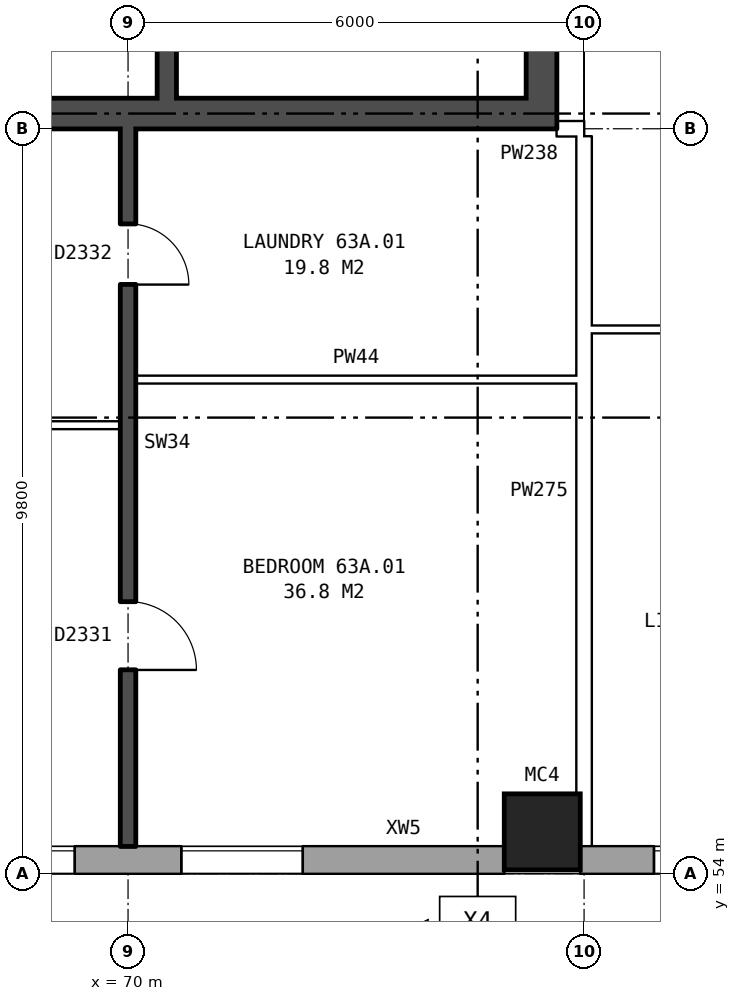
"""IFC4 building model, lengths in metres.
Left out: names, types, materials, properties, quantities, classifications, styles, units other than length and angle.
Written with IfcOpenShell. Run it as: python <this file> out.ifc"""

import sys

from ifc_helpers import new_model, si_unit, direction, frame, frame_2d, origin, origin_2d, place, context, subcontext, project, spatial, rectangle, hollow_rectangle, extrude, element, fill, save


model = new_model("IFC4")
c1 = context("Model", 3, precision=1e-05, world=origin(), true_north=direction((0.0, 1.0)))
c2 = subcontext(c1, "Body", "Model", "MODEL_VIEW")
j1 = project(units=[si_unit("LENGTHUNIT", "METRE"), si_unit("PLANEANGLEUNIT", "RADIAN")], contexts=[c1])
p1 = place(None, origin())
s1 = spatial("IfcSite", under=j1, at=p1, CompositionType="ELEMENT")
p2 = place(p1, origin())
s2 = spatial("IfcBuilding", under=s1, at=p2, CompositionType="ELEMENT")
p3 = place(p2, frame((0.0, 0.0, 224.5)))
s3 = spatial("IfcBuildingStorey", under=s2, at=p3, CompositionType="ELEMENT", Elevation=224.5)
p4 = place(p3, frame((75.45, 54.55, 0.0), z_axis=(0.0, 0.0, 1.0), x_axis=(1.0, 0.0, 0.0)))
e1 = element("IfcColumn", 1, at=p4, inside=s3, PredefinedType="COLUMN", context=c2, shape_type="SweptSolid", body=[
    extrude(hollow_rectangle(XDim=1.0, YDim=1.0, WallThickness=0.055, at=origin_2d()), origin(), (0.0, 0.0, 1.0), 3.1),
])
p5 = place(p3, frame((35.075, 54.18, 0.0), z_axis=(0.0, 0.0, 1.0), x_axis=(1.0, 0.0, 0.0)))
e2 = element("IfcWall", 2, at=p5, inside=s3, PredefinedType="STANDARD", context=c2, shape_type="SweptSolid", body=[
    extrude(rectangle(XDim=39.875, YDim=0.36, at=frame_2d((19.938, 0.0))), origin(), (0.0, 0.0, 1.0), 2.85),
])
p6 = place(p5, frame((2.625, 0.0, 0.8)))
e3 = element("IfcOpeningElement", 3, at=p6, cuts=e2, PredefinedType="OPENING", context=c2, shape_type="SweptSolid", body=[
    extrude(rectangle(XDim=1.6, YDim=1.8, at=frame_2d((0.8, 0.9))), frame((0.0, 0.19, 0.0), z_axis=(0.0, -1.0, 0.0), x_axis=(1.0, 0.0, 0.0)), (0.0, 0.0, 1.0), 0.38),
])
p7 = place(p5, frame((5.625, 0.0, 0.8)))
e4 = element("IfcOpeningElement", 4, at=p7, cuts=e2, PredefinedType="OPENING", context=c2, shape_type="SweptSolid", body=[
    extrude(rectangle(XDim=1.6, YDim=1.8, at=frame_2d((0.8, 0.9))), frame((0.0, 0.19, 0.0), z_axis=(0.0, -1.0, 0.0), x_axis=(1.0, 0.0, 0.0)), (0.0, 0.0, 1.0), 0.38),
])
p8 = place(p5, frame((8.625, 0.0, 0.8)))
e5 = element("IfcOpeningElement", 5, at=p8, cuts=e2, PredefinedType="OPENING", context=c2, shape_type="SweptSolid", body=[
    extrude(rectangle(XDim=1.6, YDim=1.8, at=frame_2d((0.8, 0.9))), frame((0.0, 0.19, 0.0), z_axis=(0.0, -1.0, 0.0), x_axis=(1.0, 0.0, 0.0)), (0.0, 0.0, 1.0), 0.38),
])
p9 = place(p5, frame((11.125, 0.0, 1.65)))
e6 = element("IfcOpeningElement", 6, at=p9, cuts=e2, PredefinedType="OPENING", context=c2, shape_type="SweptSolid", body=[
    extrude(rectangle(XDim=0.6, YDim=0.9, at=frame_2d((0.3, 0.45))), frame((0.0, 0.19, 0.0), z_axis=(0.0, -1.0, 0.0), x_axis=(1.0, 0.0, 0.0)), (0.0, 0.0, 1.0), 0.38),
])
p10 = place(p5, frame((14.625, 0.0, 0.8)))
e7 = element("IfcOpeningElement", 7, at=p10, cuts=e2, PredefinedType="OPENING", context=c2, shape_type="SweptSolid", body=[
    extrude(rectangle(XDim=1.6, YDim=1.8, at=frame_2d((0.8, 0.9))), frame((0.0, 0.19, 0.0), z_axis=(0.0, -1.0, 0.0), x_axis=(1.0, 0.0, 0.0)), (0.0, 0.0, 1.0), 0.38),
])
p11 = place(p5, frame((17.625, 0.0, 0.8)))
e8 = element("IfcOpeningElement", 8, at=p11, cuts=e2, PredefinedType="OPENING", context=c2, shape_type="SweptSolid", body=[
    extrude(rectangle(XDim=1.6, YDim=1.8, at=frame_2d((0.8, 0.9))), frame((0.0, 0.19, 0.0), z_axis=(0.0, -1.0, 0.0), x_axis=(1.0, 0.0, 0.0)), (0.0, 0.0, 1.0), 0.38),
])
p12 = place(p5, frame((20.625, 0.0, 0.8)))
e9 = element("IfcOpeningElement", 9, at=p12, cuts=e2, PredefinedType="OPENING", context=c2, shape_type="SweptSolid", body=[
    extrude(rectangle(XDim=1.6, YDim=1.8, at=frame_2d((0.8, 0.9))), frame((0.0, 0.19, 0.0), z_axis=(0.0, -1.0, 0.0), x_axis=(1.0, 0.0, 0.0)), (0.0, 0.0, 1.0), 0.38),
])
p13 = place(p5, frame((23.125, 0.0, 0.75)))
e10 = element("IfcOpeningElement", 10, at=p13, cuts=e2, PredefinedType="OPENING", context=c2, shape_type="SweptSolid", body=[
    extrude(rectangle(XDim=1.2, YDim=1.8, at=frame_2d((0.6, 0.9))), frame((0.0, 0.19, 0.0), z_axis=(0.0, -1.0, 0.0), x_axis=(1.0, 0.0, 0.0)), (0.0, 0.0, 1.0), 0.38),
])
p14 = place(p5, frame((26.625, 0.0, 0.8)))
e11 = element("IfcOpeningElement", 11, at=p14, cuts=e2, PredefinedType="OPENING", context=c2, shape_type="SweptSolid", body=[
    extrude(rectangle(XDim=1.6, YDim=1.8, at=frame_2d((0.8, 0.9))), frame((0.0, 0.19, 0.0), z_axis=(0.0, -1.0, 0.0), x_axis=(1.0, 0.0, 0.0)), (0.0, 0.0, 1.0), 0.38),
])
p15 = place(p5, frame((29.625, 0.0, 0.8)))
e12 = element("IfcOpeningElement", 12, at=p15, cuts=e2, PredefinedType="OPENING", context=c2, shape_type="SweptSolid", body=[
    extrude(rectangle(XDim=1.6, YDim=1.8, at=frame_2d((0.8, 0.9))), frame((0.0, 0.19, 0.0), z_axis=(0.0, -1.0, 0.0), x_axis=(1.0, 0.0, 0.0)), (0.0, 0.0, 1.0), 0.38),
])
p16 = place(p5, frame((32.625, 0.0, 0.8)))
e13 = element("IfcOpeningElement", 13, at=p16, cuts=e2, PredefinedType="OPENING", context=c2, shape_type="SweptSolid", body=[
    extrude(rectangle(XDim=1.6, YDim=1.8, at=frame_2d((0.8, 0.9))), frame((0.0, 0.19, 0.0), z_axis=(0.0, -1.0, 0.0), x_axis=(1.0, 0.0, 0.0)), (0.0, 0.0, 1.0), 0.38),
])
p17 = place(p5, frame((35.625, 0.0, 0.8)))
e14 = element("IfcOpeningElement", 14, at=p17, cuts=e2, PredefinedType="OPENING", context=c2, shape_type="SweptSolid", body=[
    extrude(rectangle(XDim=1.6, YDim=1.8, at=frame_2d((0.8, 0.9))), frame((0.0, 0.19, 0.0), z_axis=(0.0, -1.0, 0.0), x_axis=(1.0, 0.0, 0.0)), (0.0, 0.0, 1.0), 0.38),
])
p18 = place(p5, frame((12.925, 0.0, 0.15)))
e15 = element("IfcOpeningElement", 15, at=p18, cuts=e2, PredefinedType="OPENING", context=c2, shape_type="SweptSolid", body=[
    extrude(rectangle(XDim=0.8, YDim=1.5, at=frame_2d((0.4, 0.75))), frame((0.0, 0.19, 0.0), z_axis=(0.0, -1.0, 0.0), x_axis=(1.0, 0.0, 0.0)), (0.0, 0.0, 1.0), 0.38),
])
p19 = place(p5, frame((24.625, 0.0, 0.25)))
e16 = element("IfcOpeningElement", 16, at=p19, cuts=e2, PredefinedType="OPENING", context=c2, shape_type="SweptSolid", body=[
    extrude(rectangle(XDim=0.6, YDim=0.9, at=frame_2d((0.3, 0.45))), frame((0.0, 0.19, 0.0), z_axis=(0.0, -1.0, 0.0), x_axis=(1.0, 0.0, 0.0)), (0.0, 0.0, 1.0), 0.38),
])
p20 = place(p3, frame((75.95, 54.18, 0.0), z_axis=(0.0, 0.0, 1.0), x_axis=(1.0, 0.0, 0.0)))
e17 = element("IfcWall", 17, at=p20, inside=s3, PredefinedType="STANDARD", context=c2, shape_type="SweptSolid", body=[
    extrude(rectangle(XDim=55.1, YDim=0.36, at=frame_2d((27.55, 0.0))), origin(), (0.0, 0.0, 1.0), 2.85),
])
p21 = place(p20, frame((0.969, 0.0, 0.8)))
e18 = element("IfcOpeningElement", 18, at=p21, cuts=e17, PredefinedType="OPENING", context=c2, shape_type="SweptSolid", body=[
    extrude(rectangle(XDim=1.6, YDim=1.8, at=frame_2d((0.8, 0.9))), frame((0.0, 0.19, 0.0), z_axis=(0.0, -1.0, 0.0), x_axis=(1.0, 0.0, 0.0)), (0.0, 0.0, 1.0), 0.38),
])
p22 = place(p20, frame((4.406, 0.0, 0.8)))
e19 = element("IfcOpeningElement", 19, at=p22, cuts=e17, PredefinedType="OPENING", context=c2, shape_type="SweptSolid", body=[
    extrude(rectangle(XDim=1.6, YDim=1.8, at=frame_2d((0.8, 0.9))), frame((0.0, 0.19, 0.0), z_axis=(0.0, -1.0, 0.0), x_axis=(1.0, 0.0, 0.0)), (0.0, 0.0, 1.0), 0.38),
])
p23 = place(p20, frame((7.844, 0.0, 0.8)))
e20 = element("IfcOpeningElement", 20, at=p23, cuts=e17, PredefinedType="OPENING", context=c2, shape_type="SweptSolid", body=[
    extrude(rectangle(XDim=1.6, YDim=1.8, at=frame_2d((0.8, 0.9))), frame((0.0, 0.19, 0.0), z_axis=(0.0, -1.0, 0.0), x_axis=(1.0, 0.0, 0.0)), (0.0, 0.0, 1.0), 0.38),
])
p24 = place(p20, frame((11.281, 0.0, 0.8)))
e21 = element("IfcOpeningElement", 21, at=p24, cuts=e17, PredefinedType="OPENING", context=c2, shape_type="SweptSolid", body=[
    extrude(rectangle(XDim=1.6, YDim=1.8, at=frame_2d((0.8, 0.9))), frame((0.0, 0.19, 0.0), z_axis=(0.0, -1.0, 0.0), x_axis=(1.0, 0.0, 0.0)), (0.0, 0.0, 1.0), 0.38),
])
p25 = place(p20, frame((14.719, 0.0, 0.8)))
e22 = element("IfcOpeningElement", 22, at=p25, cuts=e17, PredefinedType="OPENING", context=c2, shape_type="SweptSolid", body=[
    extrude(rectangle(XDim=1.6, YDim=1.8, at=frame_2d((0.8, 0.9))), frame((0.0, 0.19, 0.0), z_axis=(0.0, -1.0, 0.0), x_axis=(1.0, 0.0, 0.0)), (0.0, 0.0, 1.0), 0.38),
])
p26 = place(p20, frame((18.156, 0.0, 0.8)))
e23 = element("IfcOpeningElement", 23, at=p26, cuts=e17, PredefinedType="OPENING", context=c2, shape_type="SweptSolid", body=[
    extrude(rectangle(XDim=1.6, YDim=1.8, at=frame_2d((0.8, 0.9))), frame((0.0, 0.19, 0.0), z_axis=(0.0, -1.0, 0.0), x_axis=(1.0, 0.0, 0.0)), (0.0, 0.0, 1.0), 0.38),
])
p27 = place(p20, frame((21.594, 0.0, 0.8)))
e24 = element("IfcOpeningElement", 24, at=p27, cuts=e17, PredefinedType="OPENING", context=c2, shape_type="SweptSolid", body=[
    extrude(rectangle(XDim=1.6, YDim=1.8, at=frame_2d((0.8, 0.9))), frame((0.0, 0.19, 0.0), z_axis=(0.0, -1.0, 0.0), x_axis=(1.0, 0.0, 0.0)), (0.0, 0.0, 1.0), 0.38),
])
p28 = place(p20, frame((25.031, 0.0, 0.8)))
e25 = element("IfcOpeningElement", 25, at=p28, cuts=e17, PredefinedType="OPENING", context=c2, shape_type="SweptSolid", body=[
    extrude(rectangle(XDim=1.6, YDim=1.8, at=frame_2d((0.8, 0.9))), frame((0.0, 0.19, 0.0), z_axis=(0.0, -1.0, 0.0), x_axis=(1.0, 0.0, 0.0)), (0.0, 0.0, 1.0), 0.38),
])
p29 = place(p20, frame((28.469, 0.0, 0.8)))
e26 = element("IfcOpeningElement", 26, at=p29, cuts=e17, PredefinedType="OPENING", context=c2, shape_type="SweptSolid", body=[
    extrude(rectangle(XDim=1.6, YDim=1.8, at=frame_2d((0.8, 0.9))), frame((0.0, 0.19, 0.0), z_axis=(0.0, -1.0, 0.0), x_axis=(1.0, 0.0, 0.0)), (0.0, 0.0, 1.0), 0.38),
])
p30 = place(p20, frame((31.906, 0.0, 0.8)))
e27 = element("IfcOpeningElement", 27, at=p30, cuts=e17, PredefinedType="OPENING", context=c2, shape_type="SweptSolid", body=[
    extrude(rectangle(XDim=1.6, YDim=1.8, at=frame_2d((0.8, 0.9))), frame((0.0, 0.19, 0.0), z_axis=(0.0, -1.0, 0.0), x_axis=(1.0, 0.0, 0.0)), (0.0, 0.0, 1.0), 0.38),
])
p31 = place(p20, frame((35.344, 0.0, 0.8)))
e28 = element("IfcOpeningElement", 28, at=p31, cuts=e17, PredefinedType="OPENING", context=c2, shape_type="SweptSolid", body=[
    extrude(rectangle(XDim=1.6, YDim=1.8, at=frame_2d((0.8, 0.9))), frame((0.0, 0.19, 0.0), z_axis=(0.0, -1.0, 0.0), x_axis=(1.0, 0.0, 0.0)), (0.0, 0.0, 1.0), 0.38),
])
p32 = place(p20, frame((38.781, 0.0, 0.8)))
e29 = element("IfcOpeningElement", 29, at=p32, cuts=e17, PredefinedType="OPENING", context=c2, shape_type="SweptSolid", body=[
    extrude(rectangle(XDim=1.6, YDim=1.8, at=frame_2d((0.8, 0.9))), frame((0.0, 0.19, 0.0), z_axis=(0.0, -1.0, 0.0), x_axis=(1.0, 0.0, 0.0)), (0.0, 0.0, 1.0), 0.38),
])
p33 = place(p20, frame((42.219, 0.0, 0.8)))
e30 = element("IfcOpeningElement", 30, at=p33, cuts=e17, PredefinedType="OPENING", context=c2, shape_type="SweptSolid", body=[
    extrude(rectangle(XDim=1.6, YDim=1.8, at=frame_2d((0.8, 0.9))), frame((0.0, 0.19, 0.0), z_axis=(0.0, -1.0, 0.0), x_axis=(1.0, 0.0, 0.0)), (0.0, 0.0, 1.0), 0.38),
])
p34 = place(p20, frame((45.656, 0.0, 0.8)))
e31 = element("IfcOpeningElement", 31, at=p34, cuts=e17, PredefinedType="OPENING", context=c2, shape_type="SweptSolid", body=[
    extrude(rectangle(XDim=1.6, YDim=1.8, at=frame_2d((0.8, 0.9))), frame((0.0, 0.19, 0.0), z_axis=(0.0, -1.0, 0.0), x_axis=(1.0, 0.0, 0.0)), (0.0, 0.0, 1.0), 0.38),
])
p35 = place(p20, frame((49.094, 0.0, 0.8)))
e32 = element("IfcOpeningElement", 32, at=p35, cuts=e17, PredefinedType="OPENING", context=c2, shape_type="SweptSolid", body=[
    extrude(rectangle(XDim=1.6, YDim=1.8, at=frame_2d((0.8, 0.9))), frame((0.0, 0.19, 0.0), z_axis=(0.0, -1.0, 0.0), x_axis=(1.0, 0.0, 0.0)), (0.0, 0.0, 1.0), 0.38),
])
p36 = place(p20, frame((52.531, 0.0, 0.8)))
e33 = element("IfcOpeningElement", 33, at=p36, cuts=e17, PredefinedType="OPENING", context=c2, shape_type="SweptSolid", body=[
    extrude(rectangle(XDim=1.6, YDim=1.8, at=frame_2d((0.8, 0.9))), frame((0.0, 0.19, 0.0), z_axis=(0.0, -1.0, 0.0), x_axis=(1.0, 0.0, 0.0)), (0.0, 0.0, 1.0), 0.38),
])
p37 = place(p3, frame((75.44, 63.8, 0.0), z_axis=(0.0, 0.0, 1.0), x_axis=(0.0, 1.0, 0.0)))
e34 = element("IfcWall", 34, at=p37, inside=s3, PredefinedType="SHEAR", context=c2, shape_type="SweptSolid", body=[
    extrude(rectangle(XDim=12.4, YDim=0.4, at=frame_2d((6.2, 0.0))), origin(), (0.0, 0.0, 1.0), 2.85),
])
p38 = place(p37, frame((9.8, 0.0, 0.0)))
e35 = element("IfcOpeningElement", 35, at=p38, cuts=e34, PredefinedType="OPENING", context=c2, shape_type="SweptSolid", body=[
    extrude(rectangle(XDim=1.1, YDim=2.1, at=frame_2d((0.55, 1.05))), frame((0.0, 0.21, 0.0), z_axis=(0.0, -1.0, 0.0), x_axis=(1.0, 0.0, 0.0)), (0.0, 0.0, 1.0), 0.42),
])
p39 = place(p3, frame((67.04, 64.0, 0.0), z_axis=(0.0, 0.0, 1.0), x_axis=(1.0, 0.0, 0.0)))
e36 = element("IfcWall", 36, at=p39, inside=s3, PredefinedType="SHEAR", context=c2, shape_type="SweptSolid", body=[
    extrude(rectangle(XDim=8.2, YDim=0.4, at=frame_2d((4.1, 0.0))), origin(), (0.0, 0.0, 1.0), 2.85),
])
p40 = place(p3, frame((70.51, 64.2, 0.0), z_axis=(0.0, 0.0, 1.0), x_axis=(0.0, 1.0, 0.0)))
e37 = element("IfcWall", 37, at=p40, inside=s3, PredefinedType="SHEAR", context=c2, shape_type="SweptSolid", body=[
    extrude(rectangle(XDim=2.525, YDim=0.25, at=frame_2d((1.263, 0.0))), origin(), (0.0, 0.0, 1.0), 2.85),
])
p41 = place(p3, frame((64.1, 59.9, 0.0), z_axis=(0.0, 0.0, 1.0), x_axis=(1.0, 0.0, 0.0)))
e38 = element("IfcWall", 38, at=p41, inside=s3, PredefinedType="PARTITIONING", context=c2, shape_type="SweptSolid", body=[
    extrude(rectangle(XDim=5.8, YDim=0.1, at=frame_2d((2.9, 0.0))), origin(), (0.0, 0.0, 1.0), 2.85),
])
p42 = place(p41, frame((3.6, 0.0, 0.0)))
e39 = element("IfcOpeningElement", 39, at=p42, cuts=e38, PredefinedType="OPENING", context=c2, shape_type="SweptSolid", body=[
    extrude(rectangle(XDim=0.9, YDim=2.1, at=frame_2d((0.45, 1.05))), frame((0.0, 0.06, 0.0), z_axis=(0.0, -1.0, 0.0), x_axis=(1.0, 0.0, 0.0)), (0.0, 0.0, 1.0), 0.12),
])
p43 = place(p41, frame((0.7, 0.0, 0.0)))
e40 = element("IfcOpeningElement", 40, at=p43, cuts=e38, PredefinedType="OPENING", context=c2, shape_type="SweptSolid", body=[
    extrude(rectangle(XDim=0.9, YDim=2.1, at=frame_2d((0.45, 1.05))), frame((0.0, 0.06, 0.0), z_axis=(0.0, -1.0, 0.0), x_axis=(1.0, 0.0, 0.0)), (0.0, 0.0, 1.0), 0.12),
])
p44 = place(p3, frame((70.1, 60.5, 0.0), z_axis=(0.0, 0.0, 1.0), x_axis=(1.0, 0.0, 0.0)))
e41 = element("IfcWall", 41, at=p44, inside=s3, PredefinedType="PARTITIONING", context=c2, shape_type="SweptSolid", body=[
    extrude(rectangle(XDim=5.8, YDim=0.1, at=frame_2d((2.9, 0.0))), origin(), (0.0, 0.0, 1.0), 2.85),
])
p45 = place(p3, frame((76.1, 61.16, 0.0), z_axis=(0.0, 0.0, 1.0), x_axis=(1.0, 0.0, 0.0)))
e42 = element("IfcWall", 42, at=p45, inside=s3, PredefinedType="PARTITIONING", context=c2, shape_type="SweptSolid", body=[
    extrude(rectangle(XDim=3.338, YDim=0.1, at=frame_2d((1.669, 0.0))), origin(), (0.0, 0.0, 1.0), 2.85),
])
p46 = place(p45, frame((1.219, 0.0, 0.0)))
e43 = element("IfcOpeningElement", 43, at=p46, cuts=e42, PredefinedType="OPENING", context=c2, shape_type="SweptSolid", body=[
    extrude(rectangle(XDim=0.9, YDim=2.1, at=frame_2d((0.45, 1.05))), frame((0.0, 0.06, 0.0), z_axis=(0.0, -1.0, 0.0), x_axis=(1.0, 0.0, 0.0)), (0.0, 0.0, 1.0), 0.12),
])
p47 = place(p3, frame((75.64, 63.8, 0.0), z_axis=(0.0, 0.0, 1.0), x_axis=(1.0, 0.0, 0.0)))
e44 = element("IfcWall", 44, at=p47, inside=s3, PredefinedType="PARTITIONING", context=c2, shape_type="SweptSolid", body=[
    extrude(rectangle(XDim=0.36, YDim=0.2, at=frame_2d((0.18, 0.0))), origin(), (0.0, 0.0, 1.0), 2.85),
])
p48 = place(p3, frame((70.0, 54.36, 0.0), z_axis=(0.0, 0.0, 1.0), x_axis=(0.0, 1.0, 0.0)))
e45 = element("IfcWall", 45, at=p48, inside=s3, PredefinedType="SOLIDWALL", context=c2, shape_type="SweptSolid", body=[
    extrude(rectangle(XDim=9.44, YDim=0.2, at=frame_2d((4.72, 0.0))), origin(), (0.0, 0.0, 1.0), 2.85),
])
p49 = place(p48, frame((2.32, 0.0, 0.0)))
e46 = element("IfcOpeningElement", 46, at=p49, cuts=e45, PredefinedType="OPENING", context=c2, shape_type="SweptSolid", body=[
    extrude(rectangle(XDim=0.9, YDim=2.1, at=frame_2d((0.45, 1.05))), frame((0.0, 0.11, 0.0), z_axis=(0.0, -1.0, 0.0), x_axis=(1.0, 0.0, 0.0)), (0.0, 0.0, 1.0), 0.22),
])
p50 = place(p48, frame((7.39, 0.0, 0.0)))
e47 = element("IfcOpeningElement", 47, at=p50, cuts=e45, PredefinedType="OPENING", context=c2, shape_type="SweptSolid", body=[
    extrude(rectangle(XDim=0.8, YDim=2.1, at=frame_2d((0.4, 1.05))), frame((0.0, 0.11, 0.0), z_axis=(0.0, -1.0, 0.0), x_axis=(1.0, 0.0, 0.0)), (0.0, 0.0, 1.0), 0.22),
])
p51 = place(p3, frame((76.0, 54.36, 0.0), z_axis=(0.0, 0.0, 1.0), x_axis=(0.0, 1.0, 0.0)))
e48 = element("IfcWall", 48, at=p51, inside=s3, PredefinedType="PARTITIONING", context=c2, shape_type="SweptSolid", body=[
    extrude(rectangle(XDim=9.34, YDim=0.2, at=frame_2d((4.67, 0.0))), origin(), (0.0, 0.0, 1.0), 2.85),
])
p52 = place(p16, origin())
e49 = element("IfcWindow", 49, at=p52, inside=s3, PartitioningType="SINGLE_PANEL", PredefinedType="WINDOW", context=c2, shape_type="SweptSolid", body=[
    extrude(rectangle(XDim=1.6, YDim=1.8, at=frame_2d((0.8, 0.9))), frame((0.0, 0.15, 0.0), z_axis=(0.0, -1.0, 0.0), x_axis=(1.0, 0.0, 0.0)), (0.0, 0.0, 1.0), 0.06),
])
fill(e13, e49)
p53 = place(p17, origin())
e50 = element("IfcWindow", 50, at=p53, inside=s3, PartitioningType="SINGLE_PANEL", PredefinedType="WINDOW", context=c2, shape_type="SweptSolid", body=[
    extrude(rectangle(XDim=1.6, YDim=1.8, at=frame_2d((0.8, 0.9))), frame((0.0, 0.15, 0.0), z_axis=(0.0, -1.0, 0.0), x_axis=(1.0, 0.0, 0.0)), (0.0, 0.0, 1.0), 0.06),
])
fill(e14, e50)
p54 = place(p21, origin())
e51 = element("IfcWindow", 51, at=p54, inside=s3, PartitioningType="SINGLE_PANEL", PredefinedType="WINDOW", context=c2, shape_type="SweptSolid", body=[
    extrude(rectangle(XDim=1.6, YDim=1.8, at=frame_2d((0.8, 0.9))), frame((0.0, 0.15, 0.0), z_axis=(0.0, -1.0, 0.0), x_axis=(1.0, 0.0, 0.0)), (0.0, 0.0, 1.0), 0.06),
])
fill(e18, e51)
p55 = place(p49, frame((0.9, 0.0, 0.0), z_axis=(0.0, 0.0, 1.0), x_axis=(-1.0, 0.0, 0.0)))
e52 = element("IfcDoor", 52, at=p55, inside=s3, OperationType="SINGLE_SWING_RIGHT", PredefinedType="DOOR", context=c2, shape_type="SweptSolid", body=[
    extrude(rectangle(XDim=0.9, YDim=2.1, at=frame_2d((0.45, 1.05))), frame((0.0, 0.025, 0.0), z_axis=(0.0, -1.0, 0.0), x_axis=(1.0, 0.0, 0.0)), (0.0, 0.0, 1.0), 0.05),
])
fill(e46, e52)
p56 = place(p50, frame((0.8, 0.0, 0.0), z_axis=(0.0, 0.0, 1.0), x_axis=(-1.0, 0.0, 0.0)))
e53 = element("IfcDoor", 53, at=p56, inside=s3, OperationType="SINGLE_SWING_RIGHT", PredefinedType="DOOR", context=c2, shape_type="SweptSolid", body=[
    extrude(rectangle(XDim=0.8, YDim=2.1, at=frame_2d((0.4, 1.05))), frame((0.0, 0.025, 0.0), z_axis=(0.0, -1.0, 0.0), x_axis=(1.0, 0.0, 0.0)), (0.0, 0.0, 1.0), 0.05),
])
fill(e47, e53)
save(model, sys.argv[1])
